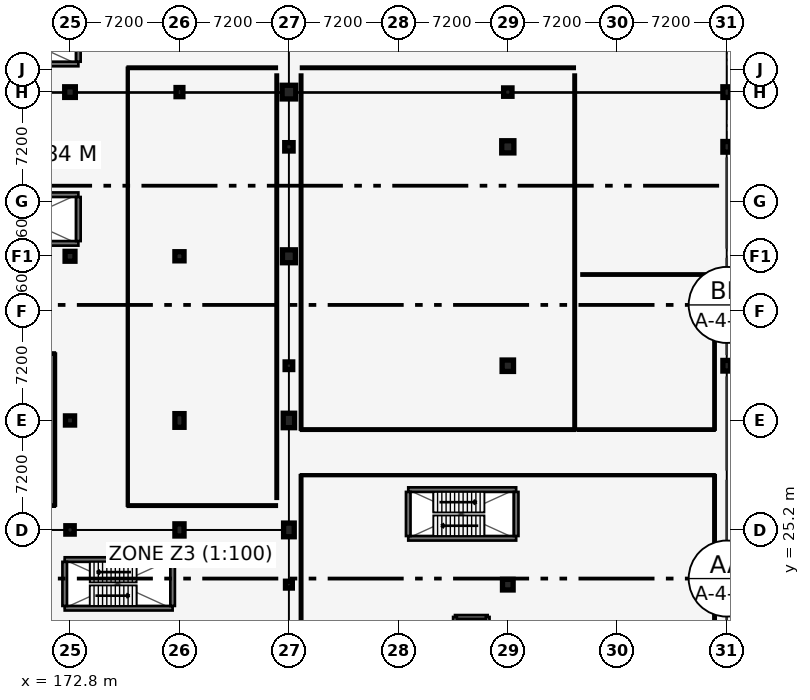
"""IFC4 building model, lengths in metres.
Left out: names, types, materials, properties, quantities, classifications, styles, units other than length and angle.
Written with IfcOpenShell. Run it as: python <this file> out.ifc"""

import sys

from ifc_helpers import new_model, si_unit, direction, frame, frame_2d, origin, origin_2d, place, context, subcontext, project, spatial, rectangle, circle, extrude, element, fill, save


model = new_model("IFC4")
c1 = context("Model", 3, precision=1e-05, world=origin(), true_north=direction((0.0, 1.0)))
c2 = subcontext(c1, "Body", "Model", "MODEL_VIEW")
j1 = project(units=[si_unit("LENGTHUNIT", "METRE"), si_unit("PLANEANGLEUNIT", "RADIAN")], contexts=[c1])
p1 = place(None, origin())
s1 = spatial("IfcSite", under=j1, at=p1, CompositionType="ELEMENT")
p2 = place(p1, origin())
s2 = spatial("IfcBuilding", under=s1, at=p2, CompositionType="ELEMENT")
p3 = place(p2, frame((0.0, 0.0, 4.8)))
s3 = spatial("IfcBuildingStorey", under=s2, at=p3, CompositionType="ELEMENT", Elevation=4.8)
p4 = place(p3, frame((172.8, 25.2, 0.0), z_axis=(0.0, 0.0, 1.0), x_axis=(1.0, 0.0, 0.0)))
e1 = element("IfcColumn", 1, at=p4, inside=s3, PredefinedType="COLUMN", context=c2, shape_type="SweptSolid", body=[
    extrude(rectangle(XDim=0.55, YDim=0.55, at=origin_2d()), origin(), (0.0, 0.0, 1.0), 4.2),
])
p5 = place(p3, frame((172.8, 32.4, 0.0), z_axis=(0.0, 0.0, 1.0), x_axis=(1.0, 0.0, 0.0)))
e2 = element("IfcColumn", 2, at=p5, inside=s3, PredefinedType="COLUMN", context=c2, shape_type="SweptSolid", body=[
    extrude(rectangle(XDim=0.6, YDim=0.6, at=origin_2d()), origin(), (0.0, 0.0, 1.0), 4.2),
])
p6 = place(p3, frame((172.8, 43.2, 0.0), z_axis=(0.0, 0.0, 1.0), x_axis=(1.0, 0.0, 0.0)))
e3 = element("IfcColumn", 3, at=p6, inside=s3, PredefinedType="COLUMN", context=c2, shape_type="SweptSolid", body=[
    extrude(rectangle(XDim=0.65, YDim=0.65, at=origin_2d()), origin(), (0.0, 0.0, 1.0), 4.2),
])
p7 = place(p3, frame((172.8, 54.0, 0.0), z_axis=(0.0, 0.0, 1.0), x_axis=(1.0, 0.0, 0.0)))
e4 = element("IfcColumn", 4, at=p7, inside=s3, PredefinedType="COLUMN", context=c2, shape_type="SweptSolid", body=[
    extrude(rectangle(XDim=0.7, YDim=0.7, at=origin_2d()), origin(), (0.0, 0.0, 1.0), 4.2),
])
p8 = place(p3, frame((180.0, 25.2, 0.0), z_axis=(0.0, 0.0, 1.0), x_axis=(1.0, 0.0, 0.0)))
e5 = element("IfcColumn", 5, at=p8, inside=s3, PredefinedType="COLUMN", context=c2, shape_type="SweptSolid", body=[
    extrude(rectangle(XDim=0.6, YDim=0.8, at=origin_2d()), origin(), (0.0, 0.0, 1.0), 4.2),
])
p9 = place(p3, frame((180.0, 32.4, 0.0), z_axis=(0.0, 0.0, 1.0), x_axis=(1.0, 0.0, 0.0)))
e6 = element("IfcColumn", 6, at=p9, inside=s3, PredefinedType="COLUMN", context=c2, shape_type="SweptSolid", body=[
    extrude(rectangle(XDim=0.6, YDim=0.9, at=origin_2d()), origin(), (0.0, 0.0, 1.0), 4.2),
])
p10 = place(p3, frame((180.0, 43.2, 0.0), z_axis=(0.0, 0.0, 1.0), x_axis=(1.0, 0.0, 0.0)))
e7 = element("IfcColumn", 7, at=p10, inside=s3, PredefinedType="COLUMN", context=c2, shape_type="SweptSolid", body=[
    extrude(circle(Radius=0.3, at=origin_2d()), origin(), (0.0, 0.0, 1.0), 4.2),
])
p11 = place(p3, frame((180.0, 54.0, 0.0), z_axis=(0.0, 0.0, 1.0), x_axis=(1.0, 0.0, 0.0)))
e8 = element("IfcColumn", 8, at=p11, inside=s3, PredefinedType="COLUMN", context=c2, shape_type="SweptSolid", body=[
    extrude(rectangle(XDim=0.45, YDim=0.6, at=origin_2d()), origin(), (0.0, 0.0, 1.0), 4.2),
])
p12 = place(p3, frame((187.2, 21.6, 0.0), z_axis=(0.0, 0.0, 1.0), x_axis=(1.0, 0.0, 0.0)))
e9 = element("IfcColumn", 9, at=p12, inside=s3, PredefinedType="COLUMN", context=c2, shape_type="SweptSolid", body=[
    extrude(rectangle(XDim=0.45, YDim=0.45, at=origin_2d()), origin(), (0.0, 0.0, 1.0), 4.2),
])
p13 = place(p3, frame((187.2, 25.2, 0.0), z_axis=(0.0, 0.0, 1.0), x_axis=(1.0, 0.0, 0.0)))
e10 = element("IfcColumn", 10, at=p13, inside=s3, PredefinedType="COLUMN", context=c2, shape_type="SweptSolid", body=[
    extrude(rectangle(XDim=0.7, YDim=0.9, at=origin_2d()), origin(), (0.0, 0.0, 1.0), 4.2),
])
p14 = place(p3, frame((187.2, 32.4, 0.0), z_axis=(0.0, 0.0, 1.0), x_axis=(1.0, 0.0, 0.0)))
e11 = element("IfcColumn", 11, at=p14, inside=s3, PredefinedType="COLUMN", context=c2, shape_type="SweptSolid", body=[
    extrude(rectangle(XDim=0.75, YDim=0.95, at=origin_2d()), origin(), (0.0, 0.0, 1.0), 4.2),
])
p15 = place(p3, frame((187.2, 36.0, 0.0), z_axis=(0.0, 0.0, 1.0), x_axis=(1.0, 0.0, 0.0)))
e12 = element("IfcColumn", 12, at=p15, inside=s3, PredefinedType="COLUMN", context=c2, shape_type="SweptSolid", body=[
    extrude(rectangle(XDim=0.5, YDim=0.5, at=origin_2d()), origin(), (0.0, 0.0, 1.0), 4.2),
])
p16 = place(p3, frame((187.2, 43.2, 0.0), z_axis=(0.0, 0.0, 1.0), x_axis=(1.0, 0.0, 0.0)))
e13 = element("IfcColumn", 13, at=p16, inside=s3, PredefinedType="COLUMN", context=c2, shape_type="SweptSolid", body=[
    extrude(rectangle(XDim=0.85, YDim=0.85, at=origin_2d()), origin(), (0.0, 0.0, 1.0), 4.2),
])
p17 = place(p3, frame((187.2, 50.4, 0.0), z_axis=(0.0, 0.0, 1.0), x_axis=(1.0, 0.0, 0.0)))
e14 = element("IfcColumn", 14, at=p17, inside=s3, PredefinedType="COLUMN", context=c2, shape_type="SweptSolid", body=[
    extrude(rectangle(XDim=0.55, YDim=0.55, at=origin_2d()), origin(), (0.0, 0.0, 1.0), 4.2),
])
p18 = place(p3, frame((187.2, 54.0, 0.0), z_axis=(0.0, 0.0, 1.0), x_axis=(1.0, 0.0, 0.0)))
e15 = element("IfcColumn", 15, at=p18, inside=s3, PredefinedType="COLUMN", context=c2, shape_type="SweptSolid", body=[
    extrude(rectangle(XDim=0.9, YDim=0.9, at=origin_2d()), origin(), (0.0, 0.0, 1.0), 4.2),
])
p19 = place(p3, frame((201.6, 21.6, 0.0), z_axis=(0.0, 0.0, 1.0), x_axis=(1.0, 0.0, 0.0)))
e16 = element("IfcColumn", 16, at=p19, inside=s3, PredefinedType="COLUMN", context=c2, shape_type="SweptSolid", body=[
    extrude(rectangle(XDim=0.7, YDim=0.7, at=origin_2d()), origin(), (0.0, 0.0, 1.0), 4.2),
])
p20 = place(p3, frame((201.6, 36.0, 0.0), z_axis=(0.0, 0.0, 1.0), x_axis=(1.0, 0.0, 0.0)))
e17 = element("IfcColumn", 17, at=p20, inside=s3, PredefinedType="COLUMN", context=c2, shape_type="SweptSolid", body=[
    extrude(rectangle(XDim=0.75, YDim=0.75, at=origin_2d()), origin(), (0.0, 0.0, 1.0), 4.2),
])
p21 = place(p3, frame((201.6, 50.4, 0.0), z_axis=(0.0, 0.0, 1.0), x_axis=(1.0, 0.0, 0.0)))
e18 = element("IfcColumn", 18, at=p21, inside=s3, PredefinedType="COLUMN", context=c2, shape_type="SweptSolid", body=[
    extrude(rectangle(XDim=0.8, YDim=0.8, at=origin_2d()), origin(), (0.0, 0.0, 1.0), 4.2),
])
p22 = place(p3, frame((201.6, 54.0, 0.0), z_axis=(0.0, 0.0, 1.0), x_axis=(1.0, 0.0, 0.0)))
e19 = element("IfcColumn", 19, at=p22, inside=s3, PredefinedType="COLUMN", context=c2, shape_type="SweptSolid", body=[
    extrude(rectangle(XDim=0.55, YDim=0.55, at=origin_2d()), origin(), (0.0, 0.0, 1.0), 4.2),
])
for number, where, z_axis, x_axis in (
    (20, (216.0, 21.6, 0.0), (0.0, 0.0, 1.0), (1.0, 0.0, 0.0)),
    (21, (216.0, 36.0, 0.0), (0.0, 0.0, 1.0), (1.0, 0.0, 0.0)),
    (22, (216.0, 50.4, 0.0), (0.0, 0.0, 1.0), (1.0, 0.0, 0.0)),
    (23, (216.0, 54.0, 0.0), (0.0, 0.0, 1.0), (1.0, 0.0, 0.0)),
):
    element("IfcColumn", number, at=place(p3, frame(where, z_axis=z_axis, x_axis=x_axis)), inside=s3, PredefinedType="COLUMN", context=c2, shape_type="SweptSolid", body=[
        extrude(rectangle(XDim=0.5, YDim=0.7, at=origin_2d()), origin(), (0.0, 0.0, 1.0), 4.2),
    ])
p23 = place(p3, frame((172.45, 20.05, 0.0), z_axis=(0.0, 0.0, 1.0), x_axis=(1.0, 0.0, 0.0)))
e24 = element("IfcWall", 24, at=p23, inside=s3, PredefinedType="SHEAR", context=c2, shape_type="SweptSolid", body=[
    extrude(rectangle(XDim=7.1, YDim=0.3, at=frame_2d((3.55, 0.0))), origin(), (0.0, 0.0, 1.0), 3.84),
])
p24 = place(p23, frame((0.35, 0.0, 0.0)))
e25 = element("IfcOpeningElement", 25, at=p24, cuts=e24, PredefinedType="OPENING", context=c2, shape_type="SweptSolid", body=[
    extrude(rectangle(XDim=1.07, YDim=2.15, at=frame_2d((0.535, 1.075))), frame((0.0, 0.16, 0.0), z_axis=(0.0, -1.0, 0.0), x_axis=(1.0, 0.0, 0.0)), (0.0, 0.0, 1.0), 0.32),
])
p25 = place(p3, frame((179.55, 23.25, 0.0), z_axis=(0.0, 0.0, 1.0), x_axis=(-1.0, 0.0, 0.0)))
e26 = element("IfcWall", 26, at=p25, inside=s3, PredefinedType="SHEAR", context=c2, shape_type="SweptSolid", body=[
    extrude(rectangle(XDim=7.1, YDim=0.3, at=frame_2d((3.55, 0.0))), origin(), (0.0, 0.0, 1.0), 3.84),
])
for number, where, z_axis, x_axis in (
    (27, (179.55, 20.2, 0.0), (0.0, 0.0, 1.0), (0.0, 1.0, 0.0)),
    (28, (172.45, 23.1, 0.0), (0.0, 0.0, 1.0), (0.0, -1.0, 0.0)),
):
    element("IfcWall", number, at=place(p3, frame(where, z_axis=z_axis, x_axis=x_axis)), inside=s3, PredefinedType="SHEAR", context=c2, shape_type="SweptSolid", body=[
        extrude(rectangle(XDim=2.9, YDim=0.3, at=frame_2d((1.45, 0.0))), origin(), (0.0, 0.0, 1.0), 3.84),
    ])
for number, where, z_axis, x_axis in (
    (29, (166.25, 44.05, 0.0), (0.0, 0.0, 1.0), (1.0, 0.0, 0.0)),
    (30, (173.35, 47.25, 0.0), (0.0, 0.0, 1.0), (-1.0, 0.0, 0.0)),
):
    element("IfcWall", number, at=place(p3, frame(where, z_axis=z_axis, x_axis=x_axis)), inside=s3, PredefinedType="SHEAR", context=c2, shape_type="SweptSolid", body=[
        extrude(rectangle(XDim=7.1, YDim=0.3, at=frame_2d((3.55, 0.0))), origin(), (0.0, 0.0, 1.0), 3.925),
    ])
p26 = place(p3, frame((173.35, 44.2, 0.0), z_axis=(0.0, 0.0, 1.0), x_axis=(0.0, 1.0, 0.0)))
e31 = element("IfcWall", 31, at=p26, inside=s3, PredefinedType="SHEAR", context=c2, shape_type="SweptSolid", body=[
    extrude(rectangle(XDim=2.9, YDim=0.3, at=frame_2d((1.45, 0.0))), origin(), (0.0, 0.0, 1.0), 3.925),
])
p27 = place(p3, frame((166.25, 55.85, 0.0), z_axis=(0.0, 0.0, 1.0), x_axis=(1.0, 0.0, 0.0)))
e32 = element("IfcWall", 32, at=p27, inside=s3, PredefinedType="SHEAR", context=c2, shape_type="SweptSolid", body=[
    extrude(rectangle(XDim=7.1, YDim=0.3, at=frame_2d((3.55, 0.0))), origin(), (0.0, 0.0, 1.0), 3.925),
])
p28 = place(p3, frame((173.35, 56.0, 0.0), z_axis=(0.0, 0.0, 1.0), x_axis=(0.0, 1.0, 0.0)))
e33 = element("IfcWall", 33, at=p28, inside=s3, PredefinedType="SHEAR", context=c2, shape_type="SweptSolid", body=[
    extrude(rectangle(XDim=2.9, YDim=0.3, at=frame_2d((1.45, 0.0))), origin(), (0.0, 0.0, 1.0), 3.925),
])
p29 = place(p3, frame((195.05, 24.65, 0.0), z_axis=(0.0, 0.0, 1.0), x_axis=(1.0, 0.0, 0.0)))
e34 = element("IfcWall", 34, at=p29, inside=s3, PredefinedType="SHEAR", context=c2, shape_type="SweptSolid", body=[
    extrude(rectangle(XDim=7.1, YDim=0.3, at=frame_2d((3.55, 0.0))), origin(), (0.0, 0.0, 1.0), 3.45),
])
p30 = place(p3, frame((202.15, 27.85, 0.0), z_axis=(0.0, 0.0, 1.0), x_axis=(-1.0, 0.0, 0.0)))
e35 = element("IfcWall", 35, at=p30, inside=s3, PredefinedType="SHEAR", context=c2, shape_type="SweptSolid", body=[
    extrude(rectangle(XDim=7.1, YDim=0.3, at=frame_2d((3.55, 0.0))), origin(), (0.0, 0.0, 1.0), 3.45),
])
p31 = place(p30, frame((5.6, 0.0, 0.0)))
e36 = element("IfcOpeningElement", 36, at=p31, cuts=e35, PredefinedType="OPENING", context=c2, shape_type="SweptSolid", body=[
    extrude(rectangle(XDim=1.07, YDim=2.15, at=frame_2d((0.535, 1.075))), frame((0.0, 0.16, 0.0), z_axis=(0.0, -1.0, 0.0), x_axis=(1.0, 0.0, 0.0)), (0.0, 0.0, 1.0), 0.32),
])
for number, where, z_axis, x_axis in (
    (37, (202.15, 24.8, 0.0), (0.0, 0.0, 1.0), (0.0, 1.0, 0.0)),
    (38, (195.05, 27.7, 0.0), (0.0, 0.0, 1.0), (0.0, -1.0, 0.0)),
):
    element("IfcWall", number, at=place(p3, frame(where, z_axis=z_axis, x_axis=x_axis)), inside=s3, PredefinedType="SHEAR", context=c2, shape_type="SweptSolid", body=[
        extrude(rectangle(XDim=2.9, YDim=0.3, at=frame_2d((1.45, 0.0))), origin(), (0.0, 0.0, 1.0), 3.45),
    ])
p32 = place(p3, frame((200.275, 19.475, 0.0), z_axis=(0.0, 0.0, 1.0), x_axis=(-1.0, 0.0, 0.0)))
e39 = element("IfcWall", 39, at=p32, inside=s3, PredefinedType="SHEAR", context=c2, shape_type="SweptSolid", body=[
    extrude(rectangle(XDim=2.15, YDim=0.25, at=frame_2d((1.075, 0.0))), origin(), (0.0, 0.0, 1.0), 3.55),
])
p33 = place(p32, frame((0.525, 0.0, 0.0)))
e40 = element("IfcOpeningElement", 40, at=p33, cuts=e39, PredefinedType="OPENING", context=c2, shape_type="SweptSolid", body=[
    extrude(rectangle(XDim=1.1, YDim=2.15, at=frame_2d((0.55, 1.075))), frame((0.0, 0.135, 0.0), z_axis=(0.0, -1.0, 0.0), x_axis=(1.0, 0.0, 0.0)), (0.0, 0.0, 1.0), 0.27),
])
for number, where, z_axis, x_axis in (
    (41, (198.125, 19.475, 0.0), (0.0, 0.0, 1.0), (0.0, -1.0, 0.0)),
    (42, (200.275, 16.525, 0.0), (0.0, 0.0, 1.0), (0.0, 1.0, 0.0)),
):
    element("IfcWall", number, at=place(p3, frame(where, z_axis=z_axis, x_axis=x_axis)), inside=s3, PredefinedType="SHEAR", context=c2, shape_type="SweptSolid", body=[
        extrude(rectangle(XDim=2.95, YDim=0.25, at=frame_2d((1.475, 0.0))), origin(), (0.0, 0.0, 1.0), 3.55),
    ])
p34 = place(p3, frame((176.6, 55.6, 0.0), z_axis=(0.0, 0.0, 1.0), x_axis=(1.0, 0.0, 0.0)))
e43 = element("IfcWall", 43, at=p34, inside=s3, PredefinedType="PARTITIONING", context=c2, shape_type="SweptSolid", body=[
    extrude(rectangle(XDim=9.8, YDim=0.15, at=frame_2d((4.9, 0.0))), origin(), (0.0, 0.0, 1.0), 3.057),
])
p35 = place(p3, frame((186.4, 26.8, 0.0), z_axis=(0.0, 0.0, 1.0), x_axis=(-1.0, 0.0, 0.0)))
e44 = element("IfcWall", 44, at=p35, inside=s3, PredefinedType="PARTITIONING", context=c2, shape_type="SweptSolid", body=[
    extrude(rectangle(XDim=9.8, YDim=0.15, at=frame_2d((4.9, 0.0))), origin(), (0.0, 0.0, 1.0), 3.472),
])
p36 = place(p3, frame((186.4, 27.25, 0.0), z_axis=(0.0, 0.0, 1.0), x_axis=(0.0, 1.0, 0.0)))
e45 = element("IfcWall", 45, at=p36, inside=s3, PredefinedType="PARTITIONING", context=c2, shape_type="SweptSolid", body=[
    extrude(rectangle(XDim=27.9, YDim=0.15, at=frame_2d((13.95, 0.0))), origin(), (0.0, 0.0, 1.0), 3.007),
])
p37 = place(p3, frame((176.6, 55.6, 0.0), z_axis=(0.0, 0.0, 1.0), x_axis=(0.0, -1.0, 0.0)))
e46 = element("IfcWall", 46, at=p37, inside=s3, PredefinedType="PARTITIONING", context=c2, shape_type="SweptSolid", body=[
    extrude(rectangle(XDim=28.8, YDim=0.11, at=frame_2d((14.4, 0.0))), origin(), (0.0, 0.0, 1.0), 3.057),
])
p38 = place(p37, frame((13.915, 0.0, 0.0)))
e47 = element("IfcOpeningElement", 47, at=p38, cuts=e46, PredefinedType="OPENING", context=c2, shape_type="SweptSolid", body=[
    extrude(rectangle(XDim=0.97, YDim=2.15, at=frame_2d((0.485, 1.075))), frame((0.0, 0.065, 0.0), z_axis=(0.0, -1.0, 0.0), x_axis=(1.0, 0.0, 0.0)), (0.0, 0.0, 1.0), 0.13),
])
for number, where, z_axis, x_axis in (
    (48, (166.2, 36.8, 0.0), (0.0, 0.0, 1.0), (1.0, 0.0, 0.0)),
    (49, (171.8, 26.8, 0.0), (0.0, 0.0, 1.0), (-1.0, 0.0, 0.0)),
):
    element("IfcWall", number, at=place(p3, frame(where, z_axis=z_axis, x_axis=x_axis)), inside=s3, PredefinedType="PARTITIONING", context=c2, shape_type="SweptSolid", body=[
        extrude(rectangle(XDim=5.6, YDim=0.14, at=frame_2d((2.8, 0.0))), origin(), (0.0, 0.0, 1.0), 3.5),
    ])
p39 = place(p3, frame((171.8, 26.8, 0.0), z_axis=(0.0, 0.0, 1.0), x_axis=(0.0, 1.0, 0.0)))
e50 = element("IfcWall", 50, at=p39, inside=s3, PredefinedType="PARTITIONING", context=c2, shape_type="SweptSolid", body=[
    extrude(rectangle(XDim=10.0, YDim=0.14, at=frame_2d((5.0, 0.0))), origin(), (0.0, 0.0, 1.0), 3.5),
])
p40 = place(p39, frame((2.703, 0.0, 0.0)))
e51 = element("IfcOpeningElement", 51, at=p40, cuts=e50, PredefinedType="OPENING", context=c2, shape_type="SweptSolid", body=[
    extrude(rectangle(XDim=0.99, YDim=2.15, at=frame_2d((0.495, 1.075))), frame((0.0, 0.08, 0.0), z_axis=(0.0, -1.0, 0.0), x_axis=(1.0, 0.0, 0.0)), (0.0, 0.0, 1.0), 0.16),
])
for number, where, z_axis, x_axis in (
    (52, (215.2, 8.45, 0.0), (0.0, 0.0, 1.0), (0.0, 1.0, 0.0)),
    (53, (188.0, 28.8, 0.0), (0.0, 0.0, 1.0), (0.0, -1.0, 0.0)),
):
    element("IfcWall", number, at=place(p3, frame(where, z_axis=z_axis, x_axis=x_axis)), inside=s3, PredefinedType="PARTITIONING", context=c2, shape_type="SweptSolid", body=[
        extrude(rectangle(XDim=20.35, YDim=0.15, at=frame_2d((10.175, 0.0))), origin(), (0.0, 0.0, 1.0), 2.979),
    ])
p41 = place(p3, frame((188.0, 28.8, 0.0), z_axis=(0.0, 0.0, 1.0), x_axis=(1.0, 0.0, 0.0)))
e54 = element("IfcWall", 54, at=p41, inside=s3, PredefinedType="PARTITIONING", context=c2, shape_type="SweptSolid", body=[
    extrude(rectangle(XDim=27.2, YDim=0.11, at=frame_2d((13.6, 0.0))), origin(), (0.0, 0.0, 1.0), 3.6),
])
p42 = place(p41, frame((12.7, 0.0, 0.0)))
e55 = element("IfcOpeningElement", 55, at=p42, cuts=e54, PredefinedType="OPENING", context=c2, shape_type="SweptSolid", body=[
    extrude(rectangle(XDim=1.8, YDim=2.2, at=frame_2d((0.9, 1.1))), frame((0.0, 0.065, 0.0), z_axis=(0.0, -1.0, 0.0), x_axis=(1.0, 0.0, 0.0)), (0.0, 0.0, 1.0), 0.13),
])
p43 = place(p3, frame((188.0, 55.6, 0.0), z_axis=(0.0, 0.0, 1.0), x_axis=(1.0, 0.0, 0.0)))
e56 = element("IfcWall", 56, at=p43, inside=s3, PredefinedType="PARTITIONING", context=c2, shape_type="SweptSolid", body=[
    extrude(rectangle(XDim=18.0, YDim=0.15, at=frame_2d((9.0, 0.0))), origin(), (0.0, 0.0, 1.0), 3.6),
])
for number, where, z_axis, x_axis in (
    (57, (206.0, 31.8, 0.0), (0.0, 0.0, 1.0), (0.0, 1.0, 0.0)),
    (58, (188.0, 55.15, 0.0), (0.0, 0.0, 1.0), (0.0, -1.0, 0.0)),
):
    element("IfcWall", number, at=place(p3, frame(where, z_axis=z_axis, x_axis=x_axis)), inside=s3, PredefinedType="PARTITIONING", context=c2, shape_type="SweptSolid", body=[
        extrude(rectangle(XDim=23.35, YDim=0.15, at=frame_2d((11.675, 0.0))), origin(), (0.0, 0.0, 1.0), 3.284),
    ])
p44 = place(p3, frame((206.0, 31.8, 0.0), z_axis=(0.0, 0.0, 1.0), x_axis=(-1.0, 0.0, 0.0)))
e59 = element("IfcWall", 59, at=p44, inside=s3, PredefinedType="PARTITIONING", context=c2, shape_type="SweptSolid", body=[
    extrude(rectangle(XDim=18.0, YDim=0.15, at=frame_2d((9.0, 0.0))), origin(), (0.0, 0.0, 1.0), 3.6),
])
p45 = place(p44, frame((8.52, 0.0, 0.0)))
e60 = element("IfcOpeningElement", 60, at=p45, cuts=e59, PredefinedType="OPENING", context=c2, shape_type="SweptSolid", body=[
    extrude(rectangle(XDim=0.96, YDim=2.15, at=frame_2d((0.48, 1.075))), frame((0.0, 0.085, 0.0), z_axis=(0.0, -1.0, 0.0), x_axis=(1.0, 0.0, 0.0)), (0.0, 0.0, 1.0), 0.17),
])
p46 = place(p3, frame((206.45, 42.0, 0.0), z_axis=(0.0, 0.0, 1.0), x_axis=(1.0, 0.0, 0.0)))
e61 = element("IfcWall", 61, at=p46, inside=s3, PredefinedType="PARTITIONING", context=c2, shape_type="SweptSolid", body=[
    extrude(rectangle(XDim=8.75, YDim=0.14, at=frame_2d((4.375, 0.0))), origin(), (0.0, 0.0, 1.0), 3.5),
])
p47 = place(p3, frame((215.2, 31.8, 0.0), z_axis=(0.0, 0.0, 1.0), x_axis=(0.0, 1.0, 0.0)))
e62 = element("IfcWall", 62, at=p47, inside=s3, PredefinedType="PARTITIONING", context=c2, shape_type="SweptSolid", body=[
    extrude(rectangle(XDim=9.75, YDim=0.14, at=frame_2d((4.875, 0.0))), origin(), (0.0, 0.0, 1.0), 3.287),
])
p48 = place(p3, frame((215.2, 31.8, 0.0), z_axis=(0.0, 0.0, 1.0), x_axis=(-1.0, 0.0, 0.0)))
e63 = element("IfcWall", 63, at=p48, inside=s3, PredefinedType="PARTITIONING", context=c2, shape_type="SweptSolid", body=[
    extrude(rectangle(XDim=9.0, YDim=0.14, at=frame_2d((4.5, 0.0))), origin(), (0.0, 0.0, 1.0), 3.5),
])
p49 = place(p48, frame((4.005, 0.0, 0.0)))
e64 = element("IfcOpeningElement", 64, at=p49, cuts=e63, PredefinedType="OPENING", context=c2, shape_type="SweptSolid", body=[
    extrude(rectangle(XDim=0.99, YDim=2.15, at=frame_2d((0.495, 1.075))), frame((0.0, 0.08, 0.0), z_axis=(0.0, -1.0, 0.0), x_axis=(1.0, 0.0, 0.0)), (0.0, 0.0, 1.0), 0.16),
])
p50 = place(p24, origin())
e65 = element("IfcDoor", 65, at=p50, inside=s3, OperationType="SINGLE_SWING_RIGHT", PredefinedType="DOOR", context=c2, shape_type="SweptSolid", body=[
    extrude(rectangle(XDim=1.07, YDim=2.15, at=frame_2d((0.535, 1.075))), frame((0.0, 0.025, 0.0), z_axis=(0.0, -1.0, 0.0), x_axis=(1.0, 0.0, 0.0)), (0.0, 0.0, 1.0), 0.05),
])
fill(e25, e65)
p51 = place(p31, origin())
e66 = element("IfcDoor", 66, at=p51, inside=s3, OperationType="SINGLE_SWING_RIGHT", PredefinedType="DOOR", context=c2, shape_type="SweptSolid", body=[
    extrude(rectangle(XDim=1.07, YDim=2.15, at=frame_2d((0.535, 1.075))), frame((0.0, 0.025, 0.0), z_axis=(0.0, -1.0, 0.0), x_axis=(1.0, 0.0, 0.0)), (0.0, 0.0, 1.0), 0.05),
])
fill(e36, e66)
p52 = place(p33, origin())
e67 = element("IfcDoor", 67, at=p52, inside=s3, OperationType="SLIDING_TO_LEFT", PredefinedType="DOOR", context=c2, shape_type="SweptSolid", body=[
    extrude(rectangle(XDim=1.1, YDim=2.15, at=frame_2d((0.55, 1.075))), frame((0.0, 0.025, 0.0), z_axis=(0.0, -1.0, 0.0), x_axis=(1.0, 0.0, 0.0)), (0.0, 0.0, 1.0), 0.05),
])
fill(e40, e67)
p53 = place(p38, origin())
e68 = element("IfcDoor", 68, at=p53, inside=s3, OperationType="SINGLE_SWING_RIGHT", PredefinedType="DOOR", context=c2, shape_type="SweptSolid", body=[
    extrude(rectangle(XDim=0.97, YDim=2.15, at=frame_2d((0.485, 1.075))), frame((0.0, 0.025, 0.0), z_axis=(0.0, -1.0, 0.0), x_axis=(1.0, 0.0, 0.0)), (0.0, 0.0, 1.0), 0.05),
])
fill(e47, e68)
p54 = place(p40, origin())
e69 = element("IfcDoor", 69, at=p54, inside=s3, OperationType="SINGLE_SWING_RIGHT", PredefinedType="DOOR", context=c2, shape_type="SweptSolid", body=[
    extrude(rectangle(XDim=0.99, YDim=2.15, at=frame_2d((0.495, 1.075))), frame((0.0, 0.025, 0.0), z_axis=(0.0, -1.0, 0.0), x_axis=(1.0, 0.0, 0.0)), (0.0, 0.0, 1.0), 0.05),
])
fill(e51, e69)
p55 = place(p42, origin())
e70 = element("IfcDoor", 70, at=p55, inside=s3, OperationType="DOUBLE_SWING_RIGHT", PredefinedType="DOOR", context=c2, shape_type="SweptSolid", body=[
    extrude(rectangle(XDim=1.8, YDim=2.2, at=frame_2d((0.9, 1.1))), frame((0.0, 0.025, 0.0), z_axis=(0.0, -1.0, 0.0), x_axis=(1.0, 0.0, 0.0)), (0.0, 0.0, 1.0), 0.05),
])
fill(e55, e70)
p56 = place(p45, origin())
e71 = element("IfcDoor", 71, at=p56, inside=s3, OperationType="SINGLE_SWING_LEFT", PredefinedType="DOOR", context=c2, shape_type="SweptSolid", body=[
    extrude(rectangle(XDim=0.96, YDim=2.15, at=frame_2d((0.48, 1.075))), frame((0.0, 0.025, 0.0), z_axis=(0.0, -1.0, 0.0), x_axis=(1.0, 0.0, 0.0)), (0.0, 0.0, 1.0), 0.05),
])
fill(e60, e71)
p57 = place(p49, origin())
e72 = element("IfcDoor", 72, at=p57, inside=s3, OperationType="SINGLE_SWING_RIGHT", PredefinedType="DOOR", context=c2, shape_type="SweptSolid", body=[
    extrude(rectangle(XDim=0.99, YDim=2.15, at=frame_2d((0.495, 1.075))), frame((0.0, 0.025, 0.0), z_axis=(0.0, -1.0, 0.0), x_axis=(1.0, 0.0, 0.0)), (0.0, 0.0, 1.0), 0.05),
])
fill(e64, e72)
save(model, sys.argv[1])
